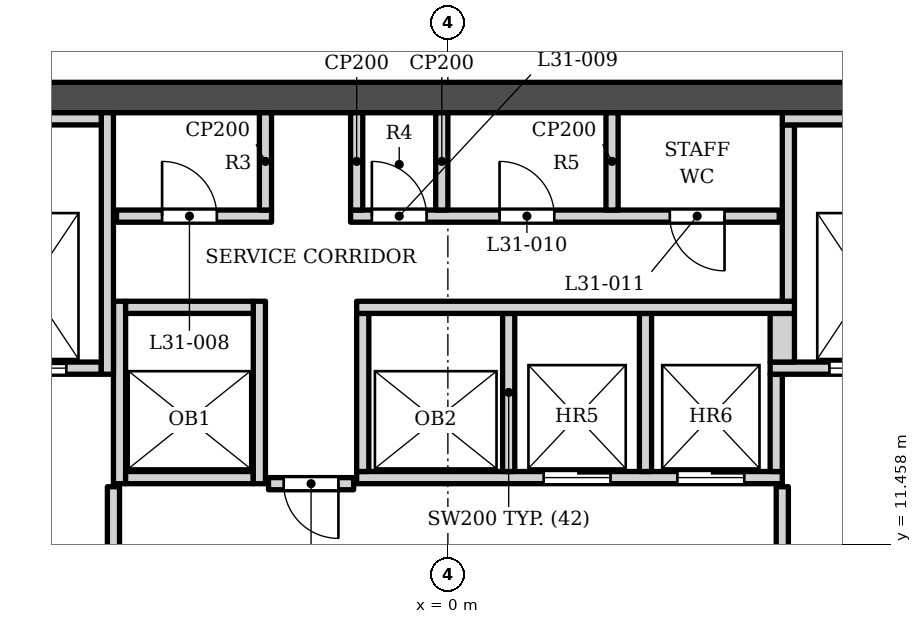
"""IFC4 building model, lengths in metres.
Left out: names, types, materials, properties, quantities, classifications, styles, units other than length and angle.
Written with IfcOpenShell. Run it as: python <this file> out.ifc"""

import sys

from ifc_helpers import new_model, si_unit, direction, frame, frame_2d, origin, place, context, subcontext, project, spatial, rectangle, extrude, element, fill, save


model = new_model("IFC4")
c1 = context("Model", 3, precision=1e-05, world=origin(), true_north=direction((0.0, 1.0)))
c2 = subcontext(c1, "Body", "Model", "MODEL_VIEW")
j1 = project(units=[si_unit("LENGTHUNIT", "METRE"), si_unit("PLANEANGLEUNIT", "RADIAN")], contexts=[c1])
p1 = place(None, origin())
s1 = spatial("IfcSite", under=j1, at=p1, CompositionType="ELEMENT")
p2 = place(p1, origin())
s2 = spatial("IfcBuilding", under=s1, at=p2, CompositionType="ELEMENT")
p3 = place(p2, frame((0.0, 0.0, 132.6)))
s3 = spatial("IfcBuildingStorey", under=s2, at=p3, CompositionType="ELEMENT", Elevation=132.6)
p4 = place(p3, frame((-16.9, 18.802, 0.0), z_axis=(0.0, 0.0, 1.0), x_axis=(1.0, 0.0, 0.0)))
e1 = element("IfcWall", 1, at=p4, inside=s3, PredefinedType="SHEAR", context=c2, shape_type="SweptSolid", body=[
    extrude(rectangle(XDim=33.8, YDim=0.5, at=frame_2d((16.9, 0.0))), origin(), (0.0, 0.0, 1.0), 7.0),
])
p5 = place(p3, frame((-5.5, 9.103, 0.0), z_axis=(0.0, 0.0, 1.0), x_axis=(0.0, 1.0, 0.0)))
e2 = element("IfcWall", 2, at=p5, inside=s3, PredefinedType="SOLIDWALL", context=c2, shape_type="SweptSolid", body=[
    extrude(rectangle(XDim=3.3, YDim=0.2, at=frame_2d((1.65, 0.0))), origin(), (0.0, 0.0, 1.0), 6.7),
])
p6 = place(p5, frame((0.85, 0.0, 0.0)))
e3 = element("IfcOpeningElement", 3, at=p6, cuts=e2, PredefinedType="OPENING", context=c2, shape_type="SweptSolid", body=[
    extrude(rectangle(XDim=1.4, YDim=2.1, at=frame_2d((0.7, 1.05))), frame((0.0, 0.11, 0.0), z_axis=(0.0, -1.0, 0.0), x_axis=(1.0, 0.0, 0.0)), (0.0, 0.0, 1.0), 0.22),
])
p7 = place(p3, frame((5.5, 9.103, 0.0), z_axis=(0.0, 0.0, 1.0), x_axis=(0.0, 1.0, 0.0)))
e4 = element("IfcWall", 4, at=p7, inside=s3, PredefinedType="SOLIDWALL", context=c2, shape_type="SweptSolid", body=[
    extrude(rectangle(XDim=3.3, YDim=0.2, at=frame_2d((1.65, 0.0))), origin(), (0.0, 0.0, 1.0), 6.7),
])
p8 = place(p7, frame((0.85, 0.0, 0.0)))
e5 = element("IfcOpeningElement", 5, at=p8, cuts=e4, PredefinedType="OPENING", context=c2, shape_type="SweptSolid", body=[
    extrude(rectangle(XDim=1.4, YDim=2.1, at=frame_2d((0.7, 1.05))), frame((0.0, 0.11, 0.0), z_axis=(0.0, -1.0, 0.0), x_axis=(1.0, 0.0, 0.0)), (0.0, 0.0, 1.0), 0.22),
])
p9 = place(p3, frame((-2.95, 12.453, 0.0), z_axis=(0.0, 0.0, 1.0), x_axis=(1.0, 0.0, 0.0)))
e6 = element("IfcWall", 6, at=p9, inside=s3, PredefinedType="SOLIDWALL", context=c2, shape_type="SweptSolid", body=[
    extrude(rectangle(XDim=1.4, YDim=0.2, at=frame_2d((0.7, 0.0))), origin(), (0.0, 0.0, 1.0), 6.7),
])
p10 = place(p9, frame((0.25, 0.0, 0.0)))
e7 = element("IfcOpeningElement", 7, at=p10, cuts=e6, PredefinedType="OPENING", context=c2, shape_type="SweptSolid", body=[
    extrude(rectangle(XDim=0.9, YDim=2.1, at=frame_2d((0.45, 1.05))), frame((0.0, 0.11, 0.0), z_axis=(0.0, -1.0, 0.0), x_axis=(1.0, 0.0, 0.0)), (0.0, 0.0, 1.0), 0.22),
])
p11 = place(p3, frame((-5.4, 12.453, 0.0), z_axis=(0.0, 0.0, 1.0), x_axis=(0.0, 1.0, 0.0)))
e8 = element("IfcWall", 8, at=p11, inside=s3, PredefinedType="SOLIDWALL", context=c2, shape_type="SweptSolid", body=[
    extrude(rectangle(XDim=3.0, YDim=0.2, at=frame_2d((1.5, 0.0))), origin(), (0.0, 0.0, 1.0), 6.7),
])
p12 = place(p3, frame((-5.3, 12.552, 0.0), z_axis=(0.0, 0.0, 1.0), x_axis=(1.0, 0.0, 0.0)))
e9 = element("IfcWall", 9, at=p12, inside=s3, PredefinedType="SOLIDWALL", context=c2, shape_type="SweptSolid", body=[
    extrude(rectangle(XDim=2.1, YDim=0.2, at=frame_2d((1.05, 0.0))), origin(), (0.0, 0.0, 1.0), 6.7),
])
p13 = place(p3, frame((-3.1, 12.453, 0.0), z_axis=(0.0, 0.0, 1.0), x_axis=(0.0, 1.0, 0.0)))
e10 = element("IfcWall", 10, at=p13, inside=s3, PredefinedType="SOLIDWALL", context=c2, shape_type="SweptSolid", body=[
    extrude(rectangle(XDim=3.0, YDim=0.2, at=frame_2d((1.5, 0.0))), origin(), (0.0, 0.0, 1.0), 6.7),
])
p14 = place(p3, frame((-1.5, 12.552, 0.0), z_axis=(0.0, 0.0, 1.0), x_axis=(1.0, 0.0, 0.0)))
e11 = element("IfcWall", 11, at=p14, inside=s3, PredefinedType="SOLIDWALL", context=c2, shape_type="SweptSolid", body=[
    extrude(rectangle(XDim=7.0, YDim=0.2, at=frame_2d((3.5, 0.0))), origin(), (0.0, 0.0, 1.0), 6.7),
])
p15 = place(p14, frame((3.075, 0.0, 0.0)))
e12 = element("IfcOpeningElement", 12, at=p15, cuts=e11, PredefinedType="OPENING", context=c2, shape_type="SweptSolid", body=[
    extrude(rectangle(XDim=1.1, YDim=2.1, at=frame_2d((0.55, 1.05))), frame((0.0, 0.11, 0.0), z_axis=(0.0, -1.0, 0.0), x_axis=(1.0, 0.0, 0.0)), (0.0, 0.0, 1.0), 0.22),
])
p16 = place(p14, frame((5.275, 0.0, 0.0)))
e13 = element("IfcOpeningElement", 13, at=p16, cuts=e11, PredefinedType="OPENING", context=c2, shape_type="SweptSolid", body=[
    extrude(rectangle(XDim=1.1, YDim=2.1, at=frame_2d((0.55, 1.05))), frame((0.0, 0.11, 0.0), z_axis=(0.0, -1.0, 0.0), x_axis=(1.0, 0.0, 0.0)), (0.0, 0.0, 1.0), 0.22),
])
for number, where, z_axis, x_axis in (
    (14, (-1.4, 12.653, 0.0), (0.0, 0.0, 1.0), (0.0, 1.0, 0.0)),
    (15, (1.0, 12.653, 0.0), (0.0, 0.0, 1.0), (0.0, 1.0, 0.0)),
    (16, (3.25, 12.653, 0.0), (0.0, 0.0, 1.0), (0.0, 1.0, 0.0)),
):
    element("IfcWall", number, at=place(p3, frame(where, z_axis=z_axis, x_axis=x_axis)), inside=s3, PredefinedType="SOLIDWALL", context=c2, shape_type="SweptSolid", body=[
        extrude(rectangle(XDim=2.6, YDim=0.2, at=frame_2d((1.3, 0.0))), origin(), (0.0, 0.0, 1.0), 6.7),
    ])
p17 = place(p3, frame((5.4, 12.653, 0.0), z_axis=(0.0, 0.0, 1.0), x_axis=(0.0, 1.0, 0.0)))
e17 = element("IfcWall", 17, at=p17, inside=s3, PredefinedType="SOLIDWALL", context=c2, shape_type="SweptSolid", body=[
    extrude(rectangle(XDim=1.6, YDim=0.2, at=frame_2d((0.8, 0.0))), origin(), (0.0, 0.0, 1.0), 6.7),
])
p18 = place(p3, frame((-8.05, 14.353, 0.0), z_axis=(0.0, 0.0, 1.0), x_axis=(1.0, 0.0, 0.0)))
e18 = element("IfcWall", 18, at=p18, inside=s3, PredefinedType="SOLIDWALL", context=c2, shape_type="SweptSolid", body=[
    extrude(rectangle(XDim=2.35, YDim=0.2, at=frame_2d((1.175, 0.0))), origin(), (0.0, 0.0, 1.0), 6.7),
])
p19 = place(p18, frame((0.575, 0.0, 0.0)))
e19 = element("IfcOpeningElement", 19, at=p19, cuts=e18, PredefinedType="OPENING", context=c2, shape_type="SweptSolid", body=[
    extrude(rectangle(XDim=1.2, YDim=2.1, at=frame_2d((0.6, 1.05))), frame((0.0, 0.11, 0.0), z_axis=(0.0, -1.0, 0.0), x_axis=(1.0, 0.0, 0.0)), (0.0, 0.0, 1.0), 0.22),
])
p20 = place(p3, frame((-5.6, 14.253, 0.0), z_axis=(0.0, 0.0, 1.0), x_axis=(0.0, 1.0, 0.0)))
e20 = element("IfcWall", 20, at=p20, inside=s3, PredefinedType="SOLIDWALL", context=c2, shape_type="SweptSolid", body=[
    extrude(rectangle(XDim=4.3, YDim=0.2, at=frame_2d((2.15, 0.0))), origin(), (0.0, 0.0, 1.0), 6.7),
])
p21 = place(p3, frame((5.3, 14.353, 0.0), z_axis=(0.0, 0.0, 1.0), x_axis=(1.0, 0.0, 0.0)))
e21 = element("IfcWall", 21, at=p21, inside=s3, PredefinedType="SOLIDWALL", context=c2, shape_type="SweptSolid", body=[
    extrude(rectangle(XDim=2.75, YDim=0.2, at=frame_2d((1.375, 0.0))), origin(), (0.0, 0.0, 1.0), 6.7),
])
p22 = place(p21, frame((0.975, 0.0, 0.0)))
e22 = element("IfcOpeningElement", 22, at=p22, cuts=e21, PredefinedType="OPENING", context=c2, shape_type="SweptSolid", body=[
    extrude(rectangle(XDim=1.2, YDim=2.1, at=frame_2d((0.6, 1.05))), frame((0.0, 0.11, 0.0), z_axis=(0.0, -1.0, 0.0), x_axis=(1.0, 0.0, 0.0)), (0.0, 0.0, 1.0), 0.22),
])
p23 = place(p3, frame((5.5, 14.453, 0.0), z_axis=(0.0, 0.0, 1.0), x_axis=(0.0, 1.0, 0.0)))
e23 = element("IfcWall", 23, at=p23, inside=s3, PredefinedType="SOLIDWALL", context=c2, shape_type="SweptSolid", body=[
    extrude(rectangle(XDim=0.8, YDim=0.4, at=frame_2d((0.4, 0.0))), origin(), (0.0, 0.0, 1.0), 6.7),
])
p24 = place(p3, frame((-5.3, 15.353, 0.0), z_axis=(0.0, 0.0, 1.0), x_axis=(1.0, 0.0, 0.0)))
e24 = element("IfcWall", 24, at=p24, inside=s3, PredefinedType="SOLIDWALL", context=c2, shape_type="SweptSolid", body=[
    extrude(rectangle(XDim=2.1, YDim=0.2, at=frame_2d((1.05, 0.0))), origin(), (0.0, 0.0, 1.0), 6.7),
])
p25 = place(p3, frame((-1.5, 15.353, 0.0), z_axis=(0.0, 0.0, 1.0), x_axis=(1.0, 0.0, 0.0)))
e25 = element("IfcWall", 25, at=p25, inside=s3, PredefinedType="SOLIDWALL", context=c2, shape_type="SweptSolid", body=[
    extrude(rectangle(XDim=7.2, YDim=0.2, at=frame_2d((3.6, 0.0))), origin(), (0.0, 0.0, 1.0), 6.7),
])
p26 = place(p3, frame((5.6, 15.453, 0.0), z_axis=(0.0, 0.0, 1.0), x_axis=(0.0, 1.0, 0.0)))
e26 = element("IfcWall", 26, at=p26, inside=s3, PredefinedType="SOLIDWALL", context=c2, shape_type="SweptSolid", body=[
    extrude(rectangle(XDim=2.9, YDim=0.2, at=frame_2d((1.45, 0.0))), origin(), (0.0, 0.0, 1.0), 6.7),
])
p27 = place(p3, frame((-5.45, 16.853, 0.0), z_axis=(0.0, 0.0, 1.0), x_axis=(1.0, 0.0, 0.0)))
e27 = element("IfcWall", 27, at=p27, inside=s3, PredefinedType="SOLIDWALL", context=c2, shape_type="SweptSolid", body=[
    extrude(rectangle(XDim=2.55, YDim=0.2, at=frame_2d((1.275, 0.0))), origin(), (0.0, 0.0, 1.0), 6.7),
])
p28 = place(p27, frame((0.75, 0.0, 0.0)))
e28 = element("IfcOpeningElement", 28, at=p28, cuts=e27, PredefinedType="OPENING", context=c2, shape_type="SweptSolid", body=[
    extrude(rectangle(XDim=0.9, YDim=2.1, at=frame_2d((0.45, 1.05))), frame((0.0, 0.11, 0.0), z_axis=(0.0, -1.0, 0.0), x_axis=(1.0, 0.0, 0.0)), (0.0, 0.0, 1.0), 0.22),
])
p29 = place(p3, frame((-1.6, 16.853, 0.0), z_axis=(0.0, 0.0, 1.0), x_axis=(1.0, 0.0, 0.0)))
e29 = element("IfcWall", 29, at=p29, inside=s3, PredefinedType="SOLIDWALL", context=c2, shape_type="SweptSolid", body=[
    extrude(rectangle(XDim=7.05, YDim=0.2, at=frame_2d((3.525, 0.0))), origin(), (0.0, 0.0, 1.0), 6.7),
])
p30 = place(p29, frame((0.35, 0.0, 0.0)))
e30 = element("IfcOpeningElement", 30, at=p30, cuts=e29, PredefinedType="OPENING", context=c2, shape_type="SweptSolid", body=[
    extrude(rectangle(XDim=0.9, YDim=2.1, at=frame_2d((0.45, 1.05))), frame((0.0, 0.11, 0.0), z_axis=(0.0, -1.0, 0.0), x_axis=(1.0, 0.0, 0.0)), (0.0, 0.0, 1.0), 0.22),
])
p31 = place(p29, frame((2.45, 0.0, 0.0)))
e31 = element("IfcOpeningElement", 31, at=p31, cuts=e29, PredefinedType="OPENING", context=c2, shape_type="SweptSolid", body=[
    extrude(rectangle(XDim=0.9, YDim=2.1, at=frame_2d((0.45, 1.05))), frame((0.0, 0.11, 0.0), z_axis=(0.0, -1.0, 0.0), x_axis=(1.0, 0.0, 0.0)), (0.0, 0.0, 1.0), 0.22),
])
p32 = place(p29, frame((5.25, 0.0, 0.0)))
e32 = element("IfcOpeningElement", 32, at=p32, cuts=e29, PredefinedType="OPENING", context=c2, shape_type="SweptSolid", body=[
    extrude(rectangle(XDim=0.9, YDim=2.1, at=frame_2d((0.45, 1.05))), frame((0.0, 0.11, 0.0), z_axis=(0.0, -1.0, 0.0), x_axis=(1.0, 0.0, 0.0)), (0.0, 0.0, 1.0), 0.22),
])
for number, where, z_axis, x_axis in (
    (33, (-3.0, 16.953, 0.0), (0.0, 0.0, 1.0), (0.0, 1.0, 0.0)),
    (34, (-1.5, 16.953, 0.0), (0.0, 0.0, 1.0), (0.0, 1.0, 0.0)),
    (35, (-0.1, 16.953, 0.0), (0.0, 0.0, 1.0), (0.0, 1.0, 0.0)),
    (36, (2.7, 16.953, 0.0), (0.0, 0.0, 1.0), (0.0, 1.0, 0.0)),
):
    element("IfcWall", number, at=place(p3, frame(where, z_axis=z_axis, x_axis=x_axis)), inside=s3, PredefinedType="PARTITIONING", context=c2, shape_type="SweptSolid", body=[
        extrude(rectangle(XDim=1.6, YDim=0.2, at=frame_2d((0.8, 0.0))), origin(), (0.0, 0.0, 1.0), 6.7),
    ])
p33 = place(p3, frame((-8.05, 18.453, 0.0), z_axis=(0.0, 0.0, 1.0), x_axis=(1.0, 0.0, 0.0)))
e37 = element("IfcWall", 37, at=p33, inside=s3, PredefinedType="SOLIDWALL", context=c2, shape_type="SweptSolid", body=[
    extrude(rectangle(XDim=2.35, YDim=0.2, at=frame_2d((1.175, 0.0))), origin(), (0.0, 0.0, 1.0), 6.7),
])
p34 = place(p3, frame((5.5, 18.453, 0.0), z_axis=(0.0, 0.0, 1.0), x_axis=(1.0, 0.0, 0.0)))
e38 = element("IfcWall", 38, at=p34, inside=s3, PredefinedType="SOLIDWALL", context=c2, shape_type="SweptSolid", body=[
    extrude(rectangle(XDim=2.55, YDim=0.2, at=frame_2d((1.275, 0.0))), origin(), (0.0, 0.0, 1.0), 6.7),
])
p35 = place(p15, origin())
e39 = element("IfcDoor", 39, at=p35, inside=s3, OperationType="DOUBLE_DOOR_SLIDING", PredefinedType="DOOR", context=c2, shape_type="SweptSolid", body=[
    extrude(rectangle(XDim=1.1, YDim=2.1, at=frame_2d((0.55, 1.05))), frame((0.0, 0.025, 0.0), z_axis=(0.0, -1.0, 0.0), x_axis=(1.0, 0.0, 0.0)), (0.0, 0.0, 1.0), 0.05),
])
fill(e12, e39)
p36 = place(p16, origin())
e40 = element("IfcDoor", 40, at=p36, inside=s3, OperationType="DOUBLE_DOOR_SLIDING", PredefinedType="DOOR", context=c2, shape_type="SweptSolid", body=[
    extrude(rectangle(XDim=1.1, YDim=2.1, at=frame_2d((0.55, 1.05))), frame((0.0, 0.025, 0.0), z_axis=(0.0, -1.0, 0.0), x_axis=(1.0, 0.0, 0.0)), (0.0, 0.0, 1.0), 0.05),
])
fill(e13, e40)
p37 = place(p19, origin())
e41 = element("IfcDoor", 41, at=p37, inside=s3, OperationType="DOUBLE_DOOR_SLIDING", PredefinedType="DOOR", context=c2, shape_type="SweptSolid", body=[
    extrude(rectangle(XDim=1.2, YDim=2.1, at=frame_2d((0.6, 1.05))), frame((0.0, 0.025, 0.0), z_axis=(0.0, -1.0, 0.0), x_axis=(1.0, 0.0, 0.0)), (0.0, 0.0, 1.0), 0.05),
])
fill(e19, e41)
p38 = place(p22, origin())
e42 = element("IfcDoor", 42, at=p38, inside=s3, OperationType="DOUBLE_DOOR_SLIDING", PredefinedType="DOOR", context=c2, shape_type="SweptSolid", body=[
    extrude(rectangle(XDim=1.2, YDim=2.1, at=frame_2d((0.6, 1.05))), frame((0.0, 0.025, 0.0), z_axis=(0.0, -1.0, 0.0), x_axis=(1.0, 0.0, 0.0)), (0.0, 0.0, 1.0), 0.05),
])
fill(e22, e42)
p39 = place(p10, origin())
e43 = element("IfcDoor", 43, at=p39, inside=s3, OperationType="SINGLE_SWING_RIGHT", PredefinedType="DOOR", context=c2, shape_type="SweptSolid", body=[
    extrude(rectangle(XDim=0.9, YDim=2.1, at=frame_2d((0.45, 1.05))), frame((0.0, 0.025, 0.0), z_axis=(0.0, -1.0, 0.0), x_axis=(1.0, 0.0, 0.0)), (0.0, 0.0, 1.0), 0.05),
])
fill(e7, e43)
p40 = place(p28, origin())
e44 = element("IfcDoor", 44, at=p40, inside=s3, OperationType="SINGLE_SWING_LEFT", PredefinedType="DOOR", context=c2, shape_type="SweptSolid", body=[
    extrude(rectangle(XDim=0.9, YDim=2.1, at=frame_2d((0.45, 1.05))), frame((0.0, 0.025, 0.0), z_axis=(0.0, -1.0, 0.0), x_axis=(1.0, 0.0, 0.0)), (0.0, 0.0, 1.0), 0.05),
])
fill(e28, e44)
p41 = place(p30, origin())
e45 = element("IfcDoor", 45, at=p41, inside=s3, OperationType="SINGLE_SWING_LEFT", PredefinedType="DOOR", context=c2, shape_type="SweptSolid", body=[
    extrude(rectangle(XDim=0.9, YDim=2.1, at=frame_2d((0.45, 1.05))), frame((0.0, 0.025, 0.0), z_axis=(0.0, -1.0, 0.0), x_axis=(1.0, 0.0, 0.0)), (0.0, 0.0, 1.0), 0.05),
])
fill(e30, e45)
p42 = place(p31, origin())
e46 = element("IfcDoor", 46, at=p42, inside=s3, OperationType="SINGLE_SWING_LEFT", PredefinedType="DOOR", context=c2, shape_type="SweptSolid", body=[
    extrude(rectangle(XDim=0.9, YDim=2.1, at=frame_2d((0.45, 1.05))), frame((0.0, 0.025, 0.0), z_axis=(0.0, -1.0, 0.0), x_axis=(1.0, 0.0, 0.0)), (0.0, 0.0, 1.0), 0.05),
])
fill(e31, e46)
p43 = place(p32, origin())
e47 = element("IfcDoor", 47, at=p43, inside=s3, OperationType="SINGLE_SWING_RIGHT", PredefinedType="DOOR", context=c2, shape_type="SweptSolid", body=[
    extrude(rectangle(XDim=0.9, YDim=2.1, at=frame_2d((0.45, 1.05))), frame((0.0, 0.025, 0.0), z_axis=(0.0, -1.0, 0.0), x_axis=(1.0, 0.0, 0.0)), (0.0, 0.0, 1.0), 0.05),
])
fill(e32, e47)
save(model, sys.argv[1])
